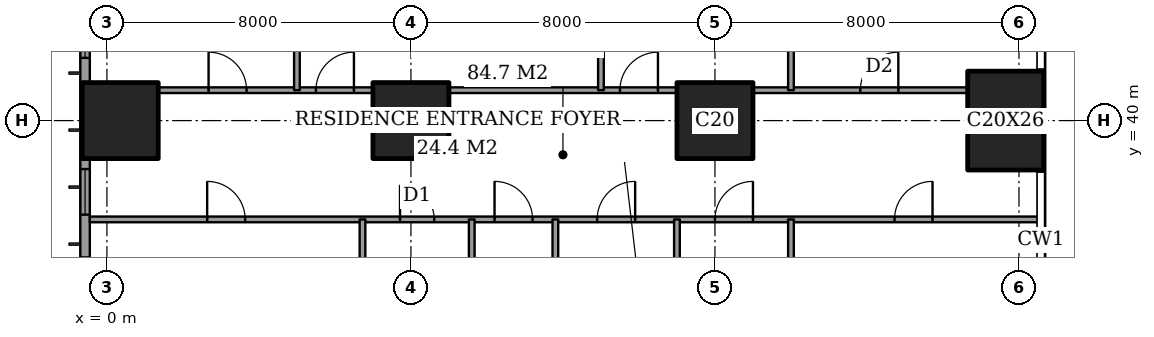
"""IFC4 building model, lengths in metres.
Left out: names, types, materials, properties, quantities, classifications, styles, units other than length and angle.
Written with IfcOpenShell. Run it as: python <this file> out.ifc"""

import sys

from ifc_helpers import new_model, si_unit, direction, frame, frame_2d, origin, origin_2d, place, context, subcontext, project, spatial, rectangle, extrude, element, fill, save


model = new_model("IFC4")
c1 = context("Model", 3, precision=1e-05, world=origin(), true_north=direction((0.0, 1.0)))
c2 = subcontext(c1, "Body", "Model", "MODEL_VIEW")
j1 = project(units=[si_unit("LENGTHUNIT", "METRE"), si_unit("PLANEANGLEUNIT", "RADIAN")], contexts=[c1])
p1 = place(None, origin())
s1 = spatial("IfcSite", under=j1, at=p1, CompositionType="ELEMENT")
p2 = place(p1, origin())
s2 = spatial("IfcBuilding", under=s1, at=p2, CompositionType="ELEMENT")
p3 = place(p2, frame((0.0, 0.0, 54.8)))
s3 = spatial("IfcBuildingStorey", under=s2, at=p3, CompositionType="ELEMENT", Elevation=54.8)
for number, where, z_axis, x_axis in (
    (1, (0.35, 40.0, 0.0), (0.0, 0.0, 1.0), (1.0, 0.0, 0.0)),
    (2, (8.0, 40.0, 0.0), (0.0, 0.0, 1.0), (1.0, 0.0, 0.0)),
    (3, (16.0, 40.0, 0.0), (0.0, 0.0, 1.0), (1.0, 0.0, 0.0)),
):
    element("IfcColumn", number, at=place(p3, frame(where, z_axis=z_axis, x_axis=x_axis)), inside=s3, PredefinedType="COLUMN", context=c2, shape_type="SweptSolid", body=[
        extrude(rectangle(XDim=2.0, YDim=2.0, at=origin_2d()), origin(), (0.0, 0.0, 1.0), 3.6),
    ])
p4 = place(p3, frame((23.65, 40.0, 0.0), z_axis=(0.0, 0.0, 1.0), x_axis=(1.0, 0.0, 0.0)))
e4 = element("IfcColumn", 4, at=p4, inside=s3, PredefinedType="COLUMN", context=c2, shape_type="SweptSolid", body=[
    extrude(rectangle(XDim=2.0, YDim=2.6, at=origin_2d()), origin(), (0.0, 0.0, 1.0), 3.6),
])
p5 = place(p3, frame((-0.575, 44.825, 0.0), z_axis=(0.0, 0.0, 1.0), x_axis=(0.0, -1.0, 0.0)))
e5 = element("IfcWall", 5, at=p5, inside=s3, PredefinedType="SOLIDWALL", context=c2, shape_type="SweptSolid", body=[
    extrude(rectangle(XDim=41.65, YDim=0.25, at=frame_2d((20.825, 0.0))), origin(), (0.0, 0.0, 1.0), 3.6),
])
p6 = place(p5, frame((0.775, 0.0, 0.6)))
e6 = element("IfcOpeningElement", 6, at=p6, cuts=e5, PredefinedType="OPENING", context=c2, shape_type="SweptSolid", body=[
    extrude(rectangle(XDim=2.4, YDim=2.0, at=frame_2d((1.2, 1.0))), frame((0.0, 0.135, 0.0), z_axis=(0.0, -1.0, 0.0), x_axis=(1.0, 0.0, 0.0)), (0.0, 0.0, 1.0), 0.27),
])
p7 = place(p5, frame((6.1, 0.0, 0.6)))
e7 = element("IfcOpeningElement", 7, at=p7, cuts=e5, PredefinedType="OPENING", context=c2, shape_type="SweptSolid", body=[
    extrude(rectangle(XDim=1.2, YDim=2.0, at=frame_2d((0.6, 1.0))), frame((0.0, 0.135, 0.0), z_axis=(0.0, -1.0, 0.0), x_axis=(1.0, 0.0, 0.0)), (0.0, 0.0, 1.0), 0.27),
])
p8 = place(p5, frame((8.425, 0.0, 0.6)))
e8 = element("IfcOpeningElement", 8, at=p8, cuts=e5, PredefinedType="OPENING", context=c2, shape_type="SweptSolid", body=[
    extrude(rectangle(XDim=2.4, YDim=2.0, at=frame_2d((1.2, 1.0))), frame((0.0, 0.135, 0.0), z_axis=(0.0, -1.0, 0.0), x_axis=(1.0, 0.0, 0.0)), (0.0, 0.0, 1.0), 0.27),
])
p9 = place(p5, frame((15.625, 0.0, 0.6)))
e9 = element("IfcOpeningElement", 9, at=p9, cuts=e5, PredefinedType="OPENING", context=c2, shape_type="SweptSolid", body=[
    extrude(rectangle(XDim=2.4, YDim=2.0, at=frame_2d((1.2, 1.0))), frame((0.0, 0.135, 0.0), z_axis=(0.0, -1.0, 0.0), x_axis=(1.0, 0.0, 0.0)), (0.0, 0.0, 1.0), 0.27),
])
p10 = place(p5, frame((23.625, 0.0, 0.6)))
e10 = element("IfcOpeningElement", 10, at=p10, cuts=e5, PredefinedType="OPENING", context=c2, shape_type="SweptSolid", body=[
    extrude(rectangle(XDim=2.4, YDim=2.0, at=frame_2d((1.2, 1.0))), frame((0.0, 0.135, 0.0), z_axis=(0.0, -1.0, 0.0), x_axis=(1.0, 0.0, 0.0)), (0.0, 0.0, 1.0), 0.27),
])
p11 = place(p5, frame((30.825, 0.0, 0.6)))
e11 = element("IfcOpeningElement", 11, at=p11, cuts=e5, PredefinedType="OPENING", context=c2, shape_type="SweptSolid", body=[
    extrude(rectangle(XDim=2.4, YDim=2.0, at=frame_2d((1.2, 1.0))), frame((0.0, 0.135, 0.0), z_axis=(0.0, -1.0, 0.0), x_axis=(1.0, 0.0, 0.0)), (0.0, 0.0, 1.0), 0.27),
])
p12 = place(p5, frame((34.5, 0.0, 0.6)))
e12 = element("IfcOpeningElement", 12, at=p12, cuts=e5, PredefinedType="OPENING", context=c2, shape_type="SweptSolid", body=[
    extrude(rectangle(XDim=1.2, YDim=2.0, at=frame_2d((0.6, 1.0))), frame((0.0, 0.135, 0.0), z_axis=(0.0, -1.0, 0.0), x_axis=(1.0, 0.0, 0.0)), (0.0, 0.0, 1.0), 0.27),
])
p13 = place(p5, frame((38.475, 0.0, 0.6)))
e13 = element("IfcOpeningElement", 13, at=p13, cuts=e5, PredefinedType="OPENING", context=c2, shape_type="SweptSolid", body=[
    extrude(rectangle(XDim=2.4, YDim=2.0, at=frame_2d((1.2, 1.0))), frame((0.0, 0.135, 0.0), z_axis=(0.0, -1.0, 0.0), x_axis=(1.0, 0.0, 0.0)), (0.0, 0.0, 1.0), 0.27),
])
p14 = place(p3, frame((-0.45, 37.4, 0.0), z_axis=(0.0, 0.0, 1.0), x_axis=(1.0, 0.0, 0.0)))
e14 = element("IfcWall", 14, at=p14, inside=s3, PredefinedType="PARTITIONING", context=c2, shape_type="SweptSolid", body=[
    extrude(rectangle(XDim=25.011, YDim=0.15, at=frame_2d((12.505, 0.0))), origin(), (0.0, 0.0, 1.0), 3.35),
])
p15 = place(p14, frame((10.65, 0.0, 0.0)))
e15 = element("IfcOpeningElement", 15, at=p15, cuts=e14, PredefinedType="OPENING", context=c2, shape_type="SweptSolid", body=[
    extrude(rectangle(XDim=1.0, YDim=2.1, at=frame_2d((0.5, 1.05))), frame((0.0, 0.085, 0.0), z_axis=(0.0, -1.0, 0.0), x_axis=(1.0, 0.0, 0.0)), (0.0, 0.0, 1.0), 0.17),
])
p16 = place(p14, frame((3.087, 0.0, 0.0)))
e16 = element("IfcOpeningElement", 16, at=p16, cuts=e14, PredefinedType="OPENING", context=c2, shape_type="SweptSolid", body=[
    extrude(rectangle(XDim=1.0, YDim=2.1, at=frame_2d((0.5, 1.05))), frame((0.0, 0.085, 0.0), z_axis=(0.0, -1.0, 0.0), x_axis=(1.0, 0.0, 0.0)), (0.0, 0.0, 1.0), 0.17),
])
p17 = place(p14, frame((8.163, 0.0, 0.0)))
e17 = element("IfcOpeningElement", 17, at=p17, cuts=e14, PredefinedType="OPENING", context=c2, shape_type="SweptSolid", body=[
    extrude(rectangle(XDim=0.9, YDim=2.1, at=frame_2d((0.45, 1.05))), frame((0.0, 0.085, 0.0), z_axis=(0.0, -1.0, 0.0), x_axis=(1.0, 0.0, 0.0)), (0.0, 0.0, 1.0), 0.17),
])
p18 = place(p14, frame((13.35, 0.0, 0.0)))
e18 = element("IfcOpeningElement", 18, at=p18, cuts=e14, PredefinedType="OPENING", context=c2, shape_type="SweptSolid", body=[
    extrude(rectangle(XDim=1.0, YDim=2.1, at=frame_2d((0.5, 1.05))), frame((0.0, 0.085, 0.0), z_axis=(0.0, -1.0, 0.0), x_axis=(1.0, 0.0, 0.0)), (0.0, 0.0, 1.0), 0.17),
])
p19 = place(p14, frame((16.45, 0.0, 0.0)))
e19 = element("IfcOpeningElement", 19, at=p19, cuts=e14, PredefinedType="OPENING", context=c2, shape_type="SweptSolid", body=[
    extrude(rectangle(XDim=1.0, YDim=2.1, at=frame_2d((0.5, 1.05))), frame((0.0, 0.085, 0.0), z_axis=(0.0, -1.0, 0.0), x_axis=(1.0, 0.0, 0.0)), (0.0, 0.0, 1.0), 0.17),
])
p20 = place(p14, frame((21.175, 0.0, 0.0)))
e20 = element("IfcOpeningElement", 20, at=p20, cuts=e14, PredefinedType="OPENING", context=c2, shape_type="SweptSolid", body=[
    extrude(rectangle(XDim=1.0, YDim=2.1, at=frame_2d((0.5, 1.05))), frame((0.0, 0.085, 0.0), z_axis=(0.0, -1.0, 0.0), x_axis=(1.0, 0.0, 0.0)), (0.0, 0.0, 1.0), 0.17),
])
p21 = place(p3, frame((1.35, 40.8, 0.0), z_axis=(0.0, 0.0, 1.0), x_axis=(1.0, 0.0, 0.0)))
e21 = element("IfcWall", 21, at=p21, inside=s3, PredefinedType="PARTITIONING", context=c2, shape_type="SweptSolid", body=[
    extrude(rectangle(XDim=5.65, YDim=0.15, at=frame_2d((2.825, 0.0))), origin(), (0.0, 0.0, 1.0), 3.35),
])
p22 = place(p21, frame((1.325, 0.0, 0.0)))
e22 = element("IfcOpeningElement", 22, at=p22, cuts=e21, PredefinedType="OPENING", context=c2, shape_type="SweptSolid", body=[
    extrude(rectangle(XDim=1.0, YDim=2.1, at=frame_2d((0.5, 1.05))), frame((0.0, 0.085, 0.0), z_axis=(0.0, -1.0, 0.0), x_axis=(1.0, 0.0, 0.0)), (0.0, 0.0, 1.0), 0.17),
])
p23 = place(p21, frame((4.15, 0.0, 0.0)))
e23 = element("IfcOpeningElement", 23, at=p23, cuts=e21, PredefinedType="OPENING", context=c2, shape_type="SweptSolid", body=[
    extrude(rectangle(XDim=1.0, YDim=2.1, at=frame_2d((0.5, 1.05))), frame((0.0, 0.085, 0.0), z_axis=(0.0, -1.0, 0.0), x_axis=(1.0, 0.0, 0.0)), (0.0, 0.0, 1.0), 0.17),
])
p24 = place(p3, frame((9.0, 40.8, 0.0), z_axis=(0.0, 0.0, 1.0), x_axis=(1.0, 0.0, 0.0)))
e24 = element("IfcWall", 24, at=p24, inside=s3, PredefinedType="PARTITIONING", context=c2, shape_type="SweptSolid", body=[
    extrude(rectangle(XDim=6.0, YDim=0.15, at=frame_2d((3.0, 0.0))), origin(), (0.0, 0.0, 1.0), 3.35),
])
p25 = place(p24, frame((4.5, 0.0, 0.0)))
e25 = element("IfcOpeningElement", 25, at=p25, cuts=e24, PredefinedType="OPENING", context=c2, shape_type="SweptSolid", body=[
    extrude(rectangle(XDim=1.0, YDim=2.1, at=frame_2d((0.5, 1.05))), frame((0.0, 0.085, 0.0), z_axis=(0.0, -1.0, 0.0), x_axis=(1.0, 0.0, 0.0)), (0.0, 0.0, 1.0), 0.17),
])
p26 = place(p3, frame((17.0, 40.8, 0.0), z_axis=(0.0, 0.0, 1.0), x_axis=(1.0, 0.0, 0.0)))
e26 = element("IfcWall", 26, at=p26, inside=s3, PredefinedType="PARTITIONING", context=c2, shape_type="SweptSolid", body=[
    extrude(rectangle(XDim=5.65, YDim=0.15, at=frame_2d((2.825, 0.0))), origin(), (0.0, 0.0, 1.0), 3.35),
])
p27 = place(p26, frame((2.825, 0.0, 0.0)))
e27 = element("IfcOpeningElement", 27, at=p27, cuts=e26, PredefinedType="OPENING", context=c2, shape_type="SweptSolid", body=[
    extrude(rectangle(XDim=1.0, YDim=2.1, at=frame_2d((0.5, 1.05))), frame((0.0, 0.085, 0.0), z_axis=(0.0, -1.0, 0.0), x_axis=(1.0, 0.0, 0.0)), (0.0, 0.0, 1.0), 0.17),
])
p28 = place(p3, frame((5.0, 40.8, 0.0), z_axis=(0.0, 0.0, 1.0), x_axis=(0.0, 1.0, 0.0)))
e28 = element("IfcWall", 28, at=p28, inside=s3, PredefinedType="PARTITIONING", context=c2, shape_type="SweptSolid", body=[
    extrude(rectangle(XDim=7.65, YDim=0.15, at=frame_2d((3.825, 0.0))), origin(), (0.0, 0.0, 1.0), 3.35),
])
p29 = place(p3, frame((6.725, 33.2, 0.0), z_axis=(0.0, 0.0, 1.0), x_axis=(0.0, 1.0, 0.0)))
e29 = element("IfcWall", 29, at=p29, inside=s3, PredefinedType="PARTITIONING", context=c2, shape_type="SweptSolid", body=[
    extrude(rectangle(XDim=4.2, YDim=0.15, at=frame_2d((2.1, 0.0))), origin(), (0.0, 0.0, 1.0), 3.35),
])
p30 = place(p3, frame((9.6, 28.0, 0.0), z_axis=(0.0, 0.0, 1.0), x_axis=(0.0, 1.0, 0.0)))
e30 = element("IfcWall", 30, at=p30, inside=s3, PredefinedType="PARTITIONING", context=c2, shape_type="SweptSolid", body=[
    extrude(rectangle(XDim=9.4, YDim=0.15, at=frame_2d((4.7, 0.0))), origin(), (0.0, 0.0, 1.0), 3.35),
])
p31 = place(p30, frame((0.5, 0.0, 0.0)))
e31 = element("IfcOpeningElement", 31, at=p31, cuts=e30, PredefinedType="OPENING", context=c2, shape_type="SweptSolid", body=[
    extrude(rectangle(XDim=1.0, YDim=2.1, at=frame_2d((0.5, 1.05))), frame((0.0, 0.085, 0.0), z_axis=(0.0, -1.0, 0.0), x_axis=(1.0, 0.0, 0.0)), (0.0, 0.0, 1.0), 0.17),
])
p32 = place(p3, frame((11.8, 30.0, 0.0), z_axis=(0.0, 0.0, 1.0), x_axis=(0.0, 1.0, 0.0)))
e32 = element("IfcWall", 32, at=p32, inside=s3, PredefinedType="PARTITIONING", context=c2, shape_type="SweptSolid", body=[
    extrude(rectangle(XDim=7.4, YDim=0.15, at=frame_2d((3.7, 0.0))), origin(), (0.0, 0.0, 1.0), 3.35),
])
p33 = place(p3, frame((13.0, 40.8, 0.0), z_axis=(0.0, 0.0, 1.0), x_axis=(0.0, 1.0, 0.0)))
e33 = element("IfcWall", 33, at=p33, inside=s3, PredefinedType="PARTITIONING", context=c2, shape_type="SweptSolid", body=[
    extrude(rectangle(XDim=7.65, YDim=0.15, at=frame_2d((3.825, 0.0))), origin(), (0.0, 0.0, 1.0), 3.35),
])
p34 = place(p3, frame((15.0, 33.2, 0.0), z_axis=(0.0, 0.0, 1.0), x_axis=(0.0, 1.0, 0.0)))
e34 = element("IfcWall", 34, at=p34, inside=s3, PredefinedType="PARTITIONING", context=c2, shape_type="SweptSolid", body=[
    extrude(rectangle(XDim=4.2, YDim=0.15, at=frame_2d((2.1, 0.0))), origin(), (0.0, 0.0, 1.0), 3.35),
])
p35 = place(p3, frame((18.0, 31.1, 0.0), z_axis=(0.0, 0.0, 1.0), x_axis=(0.0, 1.0, 0.0)))
e35 = element("IfcWall", 35, at=p35, inside=s3, PredefinedType="PARTITIONING", context=c2, shape_type="SweptSolid", body=[
    extrude(rectangle(XDim=6.3, YDim=0.15, at=frame_2d((3.15, 0.0))), origin(), (0.0, 0.0, 1.0), 3.35),
])
p36 = place(p3, frame((18.0, 40.8, 0.0), z_axis=(0.0, 0.0, 1.0), x_axis=(0.0, 1.0, 0.0)))
e36 = element("IfcWall", 36, at=p36, inside=s3, PredefinedType="PARTITIONING", context=c2, shape_type="SweptSolid", body=[
    extrude(rectangle(XDim=7.65, YDim=0.15, at=frame_2d((3.825, 0.0))), origin(), (0.0, 0.0, 1.0), 3.35),
])
p37 = place(p6, origin())
e37 = element("IfcWindow", 37, at=p37, inside=s3, PartitioningType="SINGLE_PANEL", PredefinedType="WINDOW", context=c2, shape_type="SweptSolid", body=[
    extrude(rectangle(XDim=2.4, YDim=2.0, at=frame_2d((1.2, 1.0))), frame((0.0, 0.03, 0.0), z_axis=(0.0, -1.0, 0.0), x_axis=(1.0, 0.0, 0.0)), (0.0, 0.0, 1.0), 0.06),
])
fill(e6, e37)
p38 = place(p7, origin())
e38 = element("IfcWindow", 38, at=p38, inside=s3, PartitioningType="SINGLE_PANEL", PredefinedType="WINDOW", context=c2, shape_type="SweptSolid", body=[
    extrude(rectangle(XDim=1.2, YDim=2.0, at=frame_2d((0.6, 1.0))), frame((0.0, 0.03, 0.0), z_axis=(0.0, -1.0, 0.0), x_axis=(1.0, 0.0, 0.0)), (0.0, 0.0, 1.0), 0.06),
])
fill(e7, e38)
p39 = place(p22, origin())
e39 = element("IfcDoor", 39, at=p39, inside=s3, OperationType="SINGLE_SWING_RIGHT", PredefinedType="DOOR", context=c2, shape_type="SweptSolid", body=[
    extrude(rectangle(XDim=1.0, YDim=2.1, at=frame_2d((0.5, 1.05))), frame((0.0, 0.025, 0.0), z_axis=(0.0, -1.0, 0.0), x_axis=(1.0, 0.0, 0.0)), (0.0, 0.0, 1.0), 0.05),
])
fill(e22, e39)
p40 = place(p23, origin())
e40 = element("IfcDoor", 40, at=p40, inside=s3, OperationType="SINGLE_SWING_LEFT", PredefinedType="DOOR", context=c2, shape_type="SweptSolid", body=[
    extrude(rectangle(XDim=1.0, YDim=2.1, at=frame_2d((0.5, 1.05))), frame((0.0, 0.025, 0.0), z_axis=(0.0, -1.0, 0.0), x_axis=(1.0, 0.0, 0.0)), (0.0, 0.0, 1.0), 0.05),
])
fill(e23, e40)
p41 = place(p25, origin())
e41 = element("IfcDoor", 41, at=p41, inside=s3, OperationType="SINGLE_SWING_LEFT", PredefinedType="DOOR", context=c2, shape_type="SweptSolid", body=[
    extrude(rectangle(XDim=1.0, YDim=2.1, at=frame_2d((0.5, 1.05))), frame((0.0, 0.025, 0.0), z_axis=(0.0, -1.0, 0.0), x_axis=(1.0, 0.0, 0.0)), (0.0, 0.0, 1.0), 0.05),
])
fill(e25, e41)
p42 = place(p27, origin())
e42 = element("IfcDoor", 42, at=p42, inside=s3, OperationType="SINGLE_SWING_LEFT", PredefinedType="DOOR", context=c2, shape_type="SweptSolid", body=[
    extrude(rectangle(XDim=1.0, YDim=2.1, at=frame_2d((0.5, 1.05))), frame((0.0, 0.025, 0.0), z_axis=(0.0, -1.0, 0.0), x_axis=(1.0, 0.0, 0.0)), (0.0, 0.0, 1.0), 0.05),
])
fill(e27, e42)
p43 = place(p15, origin())
e43 = element("IfcDoor", 43, at=p43, inside=s3, OperationType="SINGLE_SWING_RIGHT", PredefinedType="DOOR", context=c2, shape_type="SweptSolid", body=[
    extrude(rectangle(XDim=1.0, YDim=2.1, at=frame_2d((0.5, 1.05))), frame((0.0, 0.025, 0.0), z_axis=(0.0, -1.0, 0.0), x_axis=(1.0, 0.0, 0.0)), (0.0, 0.0, 1.0), 0.05),
])
fill(e15, e43)
p44 = place(p16, origin())
e44 = element("IfcDoor", 44, at=p44, inside=s3, OperationType="SINGLE_SWING_RIGHT", PredefinedType="DOOR", context=c2, shape_type="SweptSolid", body=[
    extrude(rectangle(XDim=1.0, YDim=2.1, at=frame_2d((0.5, 1.05))), frame((0.0, 0.025, 0.0), z_axis=(0.0, -1.0, 0.0), x_axis=(1.0, 0.0, 0.0)), (0.0, 0.0, 1.0), 0.05),
])
fill(e16, e44)
p45 = place(p17, origin())
e45 = element("IfcDoor", 45, at=p45, inside=s3, OperationType="SINGLE_SWING_RIGHT", PredefinedType="DOOR", context=c2, shape_type="SweptSolid", body=[
    extrude(rectangle(XDim=0.9, YDim=2.1, at=frame_2d((0.45, 1.05))), frame((0.0, 0.025, 0.0), z_axis=(0.0, -1.0, 0.0), x_axis=(1.0, 0.0, 0.0)), (0.0, 0.0, 1.0), 0.05),
])
fill(e17, e45)
p46 = place(p18, origin())
e46 = element("IfcDoor", 46, at=p46, inside=s3, OperationType="SINGLE_SWING_LEFT", PredefinedType="DOOR", context=c2, shape_type="SweptSolid", body=[
    extrude(rectangle(XDim=1.0, YDim=2.1, at=frame_2d((0.5, 1.05))), frame((0.0, 0.025, 0.0), z_axis=(0.0, -1.0, 0.0), x_axis=(1.0, 0.0, 0.0)), (0.0, 0.0, 1.0), 0.05),
])
fill(e18, e46)
p47 = place(p19, origin())
e47 = element("IfcDoor", 47, at=p47, inside=s3, OperationType="SINGLE_SWING_LEFT", PredefinedType="DOOR", context=c2, shape_type="SweptSolid", body=[
    extrude(rectangle(XDim=1.0, YDim=2.1, at=frame_2d((0.5, 1.05))), frame((0.0, 0.025, 0.0), z_axis=(0.0, -1.0, 0.0), x_axis=(1.0, 0.0, 0.0)), (0.0, 0.0, 1.0), 0.05),
])
fill(e19, e47)
p48 = place(p20, origin())
e48 = element("IfcDoor", 48, at=p48, inside=s3, OperationType="SINGLE_SWING_LEFT", PredefinedType="DOOR", context=c2, shape_type="SweptSolid", body=[
    extrude(rectangle(XDim=1.0, YDim=2.1, at=frame_2d((0.5, 1.05))), frame((0.0, 0.025, 0.0), z_axis=(0.0, -1.0, 0.0), x_axis=(1.0, 0.0, 0.0)), (0.0, 0.0, 1.0), 0.05),
])
fill(e20, e48)
save(model, sys.argv[1])
